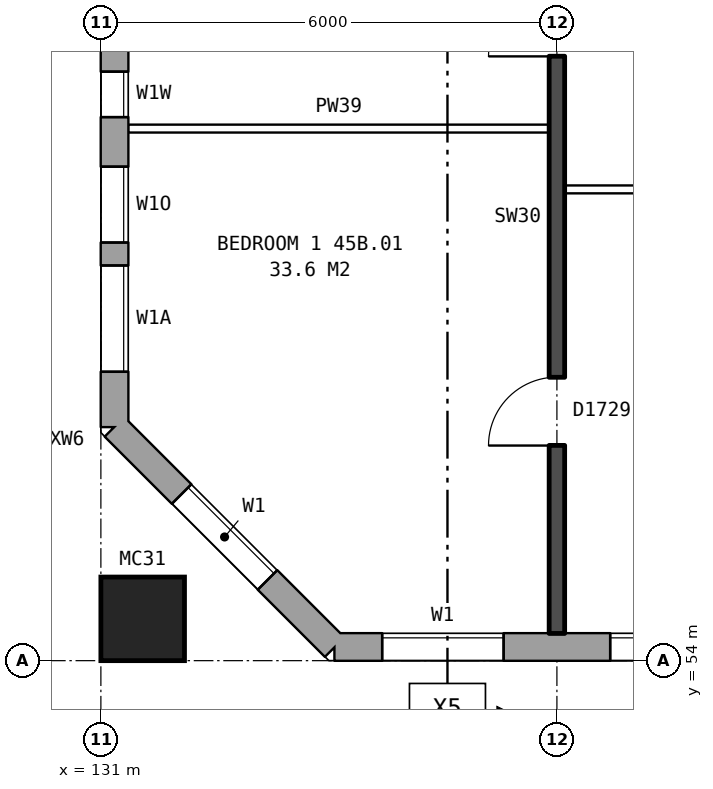
"""IFC4 building model, lengths in metres.
Left out: names, types, materials, properties, quantities, classifications, styles, units other than length and angle.
Written with IfcOpenShell. Run it as: python <this file> out.ifc"""

import sys

from ifc_helpers import new_model, si_unit, direction, frame, frame_2d, origin, origin_2d, place, context, subcontext, project, spatial, rectangle, hollow_rectangle, extrude, element, fill, save


model = new_model("IFC4")
c1 = context("Model", 3, precision=1e-05, world=origin(), true_north=direction((0.0, 1.0)))
c2 = subcontext(c1, "Body", "Model", "MODEL_VIEW")
j1 = project(units=[si_unit("LENGTHUNIT", "METRE"), si_unit("PLANEANGLEUNIT", "RADIAN")], contexts=[c1])
p1 = place(None, origin())
s1 = spatial("IfcSite", under=j1, at=p1, CompositionType="ELEMENT")
p2 = place(p1, origin())
s2 = spatial("IfcBuilding", under=s1, at=p2, CompositionType="ELEMENT")
p3 = place(p2, frame((0.0, 0.0, 160.9)))
s3 = spatial("IfcBuildingStorey", under=s2, at=p3, CompositionType="ELEMENT", Elevation=160.9)
p4 = place(p3, frame((131.55, 54.55, 0.0), z_axis=(0.0, 0.0, 1.0), x_axis=(1.0, 0.0, 0.0)))
e1 = element("IfcColumn", 1, at=p4, inside=s3, PredefinedType="COLUMN", context=c2, shape_type="SweptSolid", body=[
    extrude(hollow_rectangle(XDim=1.1, YDim=1.1, WallThickness=0.06, at=origin_2d()), origin(), (0.0, 0.0, 1.0), 3.1),
])
p5 = place(p3, frame((131.18, 57.075, 0.0), z_axis=(0.0, 0.0, 1.0), x_axis=(0.707106781187, -0.707106781187, 0.0)))
e2 = element("IfcWall", 2, at=p5, inside=s3, PredefinedType="STANDARD", context=c2, shape_type="SweptSolid", body=[
    extrude(rectangle(XDim=4.094, YDim=0.36, at=frame_2d((2.047, 0.0))), origin(), (0.0, 0.0, 1.0), 2.85),
])
p6 = place(p5, frame((1.247, 0.0, 0.8)))
e3 = element("IfcOpeningElement", 3, at=p6, cuts=e2, PredefinedType="OPENING", context=c2, shape_type="SweptSolid", body=[
    extrude(rectangle(XDim=1.6, YDim=1.8, at=frame_2d((0.8, 0.9))), frame((0.0, 0.19, 0.0), z_axis=(0.0, -1.0, 0.0), x_axis=(1.0, 0.0, 0.0)), (0.0, 0.0, 1.0), 0.38),
])
p7 = place(p3, frame((134.075, 54.18, 0.0), z_axis=(0.0, 0.0, 1.0), x_axis=(1.0, 0.0, 0.0)))
e4 = element("IfcWall", 4, at=p7, inside=s3, PredefinedType="STANDARD", context=c2, shape_type="SweptSolid", body=[
    extrude(rectangle(XDim=34.351, YDim=0.36, at=frame_2d((17.175, 0.0))), origin(), (0.0, 0.0, 1.0), 2.85),
])
p8 = place(p7, frame((0.625, 0.0, 0.8)))
e5 = element("IfcOpeningElement", 5, at=p8, cuts=e4, PredefinedType="OPENING", context=c2, shape_type="SweptSolid", body=[
    extrude(rectangle(XDim=1.6, YDim=1.8, at=frame_2d((0.8, 0.9))), frame((0.0, 0.19, 0.0), z_axis=(0.0, -1.0, 0.0), x_axis=(1.0, 0.0, 0.0)), (0.0, 0.0, 1.0), 0.38),
])
p9 = place(p7, frame((3.625, 0.0, 0.8)))
e6 = element("IfcOpeningElement", 6, at=p9, cuts=e4, PredefinedType="OPENING", context=c2, shape_type="SweptSolid", body=[
    extrude(rectangle(XDim=1.6, YDim=1.8, at=frame_2d((0.8, 0.9))), frame((0.0, 0.19, 0.0), z_axis=(0.0, -1.0, 0.0), x_axis=(1.0, 0.0, 0.0)), (0.0, 0.0, 1.0), 0.38),
])
p10 = place(p7, frame((6.625, 0.0, 0.8)))
e7 = element("IfcOpeningElement", 7, at=p10, cuts=e4, PredefinedType="OPENING", context=c2, shape_type="SweptSolid", body=[
    extrude(rectangle(XDim=1.6, YDim=1.8, at=frame_2d((0.8, 0.9))), frame((0.0, 0.19, 0.0), z_axis=(0.0, -1.0, 0.0), x_axis=(1.0, 0.0, 0.0)), (0.0, 0.0, 1.0), 0.38),
])
p11 = place(p7, frame((9.625, 0.0, 0.8)))
e8 = element("IfcOpeningElement", 8, at=p11, cuts=e4, PredefinedType="OPENING", context=c2, shape_type="SweptSolid", body=[
    extrude(rectangle(XDim=1.6, YDim=1.8, at=frame_2d((0.8, 0.9))), frame((0.0, 0.19, 0.0), z_axis=(0.0, -1.0, 0.0), x_axis=(1.0, 0.0, 0.0)), (0.0, 0.0, 1.0), 0.38),
])
p12 = place(p7, frame((12.625, 0.0, 0.15)))
e9 = element("IfcOpeningElement", 9, at=p12, cuts=e4, PredefinedType="OPENING", context=c2, shape_type="SweptSolid", body=[
    extrude(rectangle(XDim=0.8, YDim=0.9, at=frame_2d((0.4, 0.45))), frame((0.0, 0.19, 0.0), z_axis=(0.0, -1.0, 0.0), x_axis=(1.0, 0.0, 0.0)), (0.0, 0.0, 1.0), 0.38),
])
p13 = place(p7, frame((15.625, 0.0, 0.8)))
e10 = element("IfcOpeningElement", 10, at=p13, cuts=e4, PredefinedType="OPENING", context=c2, shape_type="SweptSolid", body=[
    extrude(rectangle(XDim=1.6, YDim=1.8, at=frame_2d((0.8, 0.9))), frame((0.0, 0.19, 0.0), z_axis=(0.0, -1.0, 0.0), x_axis=(1.0, 0.0, 0.0)), (0.0, 0.0, 1.0), 0.38),
])
p14 = place(p7, frame((18.625, 0.0, 0.8)))
e11 = element("IfcOpeningElement", 11, at=p14, cuts=e4, PredefinedType="OPENING", context=c2, shape_type="SweptSolid", body=[
    extrude(rectangle(XDim=1.6, YDim=1.8, at=frame_2d((0.8, 0.9))), frame((0.0, 0.19, 0.0), z_axis=(0.0, -1.0, 0.0), x_axis=(1.0, 0.0, 0.0)), (0.0, 0.0, 1.0), 0.38),
])
p15 = place(p7, frame((22.175, 0.0, 1.7)))
e12 = element("IfcOpeningElement", 12, at=p15, cuts=e4, PredefinedType="OPENING", context=c2, shape_type="SweptSolid", body=[
    extrude(rectangle(XDim=0.8, YDim=0.9, at=frame_2d((0.4, 0.45))), frame((0.0, 0.19, 0.0), z_axis=(0.0, -1.0, 0.0), x_axis=(1.0, 0.0, 0.0)), (0.0, 0.0, 1.0), 0.38),
])
p16 = place(p7, frame((24.625, 0.0, 0.8)))
e13 = element("IfcOpeningElement", 13, at=p16, cuts=e4, PredefinedType="OPENING", context=c2, shape_type="SweptSolid", body=[
    extrude(rectangle(XDim=1.6, YDim=1.8, at=frame_2d((0.8, 0.9))), frame((0.0, 0.19, 0.0), z_axis=(0.0, -1.0, 0.0), x_axis=(1.0, 0.0, 0.0)), (0.0, 0.0, 1.0), 0.38),
])
p17 = place(p7, frame((27.625, 0.0, 0.8)))
e14 = element("IfcOpeningElement", 14, at=p17, cuts=e4, PredefinedType="OPENING", context=c2, shape_type="SweptSolid", body=[
    extrude(rectangle(XDim=1.6, YDim=1.8, at=frame_2d((0.8, 0.9))), frame((0.0, 0.19, 0.0), z_axis=(0.0, -1.0, 0.0), x_axis=(1.0, 0.0, 0.0)), (0.0, 0.0, 1.0), 0.38),
])
p18 = place(p7, frame((30.625, 0.0, 0.8)))
e15 = element("IfcOpeningElement", 15, at=p18, cuts=e4, PredefinedType="OPENING", context=c2, shape_type="SweptSolid", body=[
    extrude(rectangle(XDim=1.6, YDim=1.8, at=frame_2d((0.8, 0.9))), frame((0.0, 0.19, 0.0), z_axis=(0.0, -1.0, 0.0), x_axis=(1.0, 0.0, 0.0)), (0.0, 0.0, 1.0), 0.38),
])
p19 = place(p7, frame((13.725, 0.0, 0.25)))
e16 = element("IfcOpeningElement", 16, at=p19, cuts=e4, PredefinedType="OPENING", context=c2, shape_type="SweptSolid", body=[
    extrude(rectangle(XDim=1.0, YDim=1.8, at=frame_2d((0.5, 0.9))), frame((0.0, 0.19, 0.0), z_axis=(0.0, -1.0, 0.0), x_axis=(1.0, 0.0, 0.0)), (0.0, 0.0, 1.0), 0.38),
])
p20 = place(p7, frame((23.275, 0.0, 0.8)))
e17 = element("IfcOpeningElement", 17, at=p20, cuts=e4, PredefinedType="OPENING", context=c2, shape_type="SweptSolid", body=[
    extrude(rectangle(XDim=1.0, YDim=1.8, at=frame_2d((0.5, 0.9))), frame((0.0, 0.19, 0.0), z_axis=(0.0, -1.0, 0.0), x_axis=(1.0, 0.0, 0.0)), (0.0, 0.0, 1.0), 0.38),
])
p21 = place(p3, frame((131.18, 82.925, 0.0), z_axis=(0.0, 0.0, 1.0), x_axis=(0.0, -1.0, 0.0)))
e18 = element("IfcWall", 18, at=p21, inside=s3, PredefinedType="STANDARD", context=c2, shape_type="SweptSolid", body=[
    extrude(rectangle(XDim=25.851, YDim=0.36, at=frame_2d((12.925, 0.0))), origin(), (0.0, 0.0, 1.0), 2.85),
])
p22 = place(p21, frame((1.075, 0.0, 0.8)))
e19 = element("IfcOpeningElement", 19, at=p22, cuts=e18, PredefinedType="OPENING", context=c2, shape_type="SweptSolid", body=[
    extrude(rectangle(XDim=1.2, YDim=1.8, at=frame_2d((0.6, 0.9))), frame((0.0, 0.19, 0.0), z_axis=(0.0, -1.0, 0.0), x_axis=(1.0, 0.0, 0.0)), (0.0, 0.0, 1.0), 0.38),
])
p23 = place(p21, frame((2.575, 0.0, 0.8)))
e20 = element("IfcOpeningElement", 20, at=p23, cuts=e18, PredefinedType="OPENING", context=c2, shape_type="SweptSolid", body=[
    extrude(rectangle(XDim=1.2, YDim=0.9, at=frame_2d((0.6, 0.45))), frame((0.0, 0.19, 0.0), z_axis=(0.0, -1.0, 0.0), x_axis=(1.0, 0.0, 0.0)), (0.0, 0.0, 1.0), 0.38),
])
p24 = place(p21, frame((19.475, 0.0, 1.65)))
e21 = element("IfcOpeningElement", 21, at=p24, cuts=e18, PredefinedType="OPENING", context=c2, shape_type="SweptSolid", body=[
    extrude(rectangle(XDim=1.2, YDim=0.9, at=frame_2d((0.6, 0.45))), frame((0.0, 0.19, 0.0), z_axis=(0.0, -1.0, 0.0), x_axis=(1.0, 0.0, 0.0)), (0.0, 0.0, 1.0), 0.38),
])
p25 = place(p21, frame((22.425, 0.0, 0.8)))
e22 = element("IfcOpeningElement", 22, at=p25, cuts=e18, PredefinedType="OPENING", context=c2, shape_type="SweptSolid", body=[
    extrude(rectangle(XDim=1.0, YDim=1.2, at=frame_2d((0.5, 0.6))), frame((0.0, 0.19, 0.0), z_axis=(0.0, -1.0, 0.0), x_axis=(1.0, 0.0, 0.0)), (0.0, 0.0, 1.0), 0.38),
])
p26 = place(p21, frame((4.975, 0.0, 1.7)))
e23 = element("IfcOpeningElement", 23, at=p26, cuts=e18, PredefinedType="OPENING", context=c2, shape_type="SweptSolid", body=[
    extrude(rectangle(XDim=1.4, YDim=0.9, at=frame_2d((0.7, 0.45))), frame((0.0, 0.19, 0.0), z_axis=(0.0, -1.0, 0.0), x_axis=(1.0, 0.0, 0.0)), (0.0, 0.0, 1.0), 0.38),
])
p27 = place(p21, frame((21.175, 0.0, 0.35)))
e24 = element("IfcOpeningElement", 24, at=p27, cuts=e18, PredefinedType="OPENING", context=c2, shape_type="SweptSolid", body=[
    extrude(rectangle(XDim=0.6, YDim=0.9, at=frame_2d((0.3, 0.45))), frame((0.0, 0.19, 0.0), z_axis=(0.0, -1.0, 0.0), x_axis=(1.0, 0.0, 0.0)), (0.0, 0.0, 1.0), 0.38),
])
p28 = place(p21, frame((23.725, 0.0, 0.8)))
e25 = element("IfcOpeningElement", 25, at=p28, cuts=e18, PredefinedType="OPENING", context=c2, shape_type="SweptSolid", body=[
    extrude(rectangle(XDim=1.4, YDim=1.8, at=frame_2d((0.7, 0.9))), frame((0.0, 0.19, 0.0), z_axis=(0.0, -1.0, 0.0), x_axis=(1.0, 0.0, 0.0)), (0.0, 0.0, 1.0), 0.38),
])
p29 = place(p3, frame((137.1, 60.2, 0.0), z_axis=(0.0, 0.0, 1.0), x_axis=(1.0, 0.0, 0.0)))
e26 = element("IfcWall", 26, at=p29, inside=s3, PredefinedType="PARTITIONING", context=c2, shape_type="SweptSolid", body=[
    extrude(rectangle(XDim=5.8, YDim=0.1, at=frame_2d((2.9, 0.0))), origin(), (0.0, 0.0, 1.0), 2.85),
])
p30 = place(p29, frame((1.3, 0.0, 0.0)))
e27 = element("IfcOpeningElement", 27, at=p30, cuts=e26, PredefinedType="OPENING", context=c2, shape_type="SweptSolid", body=[
    extrude(rectangle(XDim=0.9, YDim=2.1, at=frame_2d((0.45, 1.05))), frame((0.0, 0.06, 0.0), z_axis=(0.0, -1.0, 0.0), x_axis=(1.0, 0.0, 0.0)), (0.0, 0.0, 1.0), 0.12),
])
p31 = place(p29, frame((4.2, 0.0, 0.0)))
e28 = element("IfcOpeningElement", 28, at=p31, cuts=e26, PredefinedType="OPENING", context=c2, shape_type="SweptSolid", body=[
    extrude(rectangle(XDim=0.9, YDim=2.1, at=frame_2d((0.45, 1.05))), frame((0.0, 0.06, 0.0), z_axis=(0.0, -1.0, 0.0), x_axis=(1.0, 0.0, 0.0)), (0.0, 0.0, 1.0), 0.12),
])
p32 = place(p3, frame((131.36, 61.0, 0.0), z_axis=(0.0, 0.0, 1.0), x_axis=(1.0, 0.0, 0.0)))
e29 = element("IfcWall", 29, at=p32, inside=s3, PredefinedType="PARTITIONING", context=c2, shape_type="SweptSolid", body=[
    extrude(rectangle(XDim=5.54, YDim=0.1, at=frame_2d((2.77, 0.0))), origin(), (0.0, 0.0, 1.0), 2.85),
])
p33 = place(p3, frame((137.0, 54.36, 0.0), z_axis=(0.0, 0.0, 1.0), x_axis=(0.0, 1.0, 0.0)))
e30 = element("IfcWall", 30, at=p33, inside=s3, PredefinedType="SOLIDWALL", context=c2, shape_type="SweptSolid", body=[
    extrude(rectangle(XDim=9.44, YDim=0.2, at=frame_2d((4.72, 0.0))), origin(), (0.0, 0.0, 1.0), 2.85),
])
p34 = place(p33, frame((2.47, 0.0, 0.0)))
e31 = element("IfcOpeningElement", 31, at=p34, cuts=e30, PredefinedType="OPENING", context=c2, shape_type="SweptSolid", body=[
    extrude(rectangle(XDim=0.9, YDim=2.1, at=frame_2d((0.45, 1.05))), frame((0.0, 0.11, 0.0), z_axis=(0.0, -1.0, 0.0), x_axis=(1.0, 0.0, 0.0)), (0.0, 0.0, 1.0), 0.22),
])
p35 = place(p33, frame((7.59, 0.0, 0.0)))
e32 = element("IfcOpeningElement", 32, at=p35, cuts=e30, PredefinedType="OPENING", context=c2, shape_type="SweptSolid", body=[
    extrude(rectangle(XDim=0.9, YDim=2.1, at=frame_2d((0.45, 1.05))), frame((0.0, 0.11, 0.0), z_axis=(0.0, -1.0, 0.0), x_axis=(1.0, 0.0, 0.0)), (0.0, 0.0, 1.0), 0.22),
])
p36 = place(p6, origin())
e33 = element("IfcWindow", 33, at=p36, inside=s3, PartitioningType="SINGLE_PANEL", PredefinedType="WINDOW", context=c2, shape_type="SweptSolid", body=[
    extrude(rectangle(XDim=1.6, YDim=1.8, at=frame_2d((0.8, 0.9))), frame((0.0, 0.15, 0.0), z_axis=(0.0, -1.0, 0.0), x_axis=(1.0, 0.0, 0.0)), (0.0, 0.0, 1.0), 0.06),
])
fill(e3, e33)
p37 = place(p8, origin())
e34 = element("IfcWindow", 34, at=p37, inside=s3, PartitioningType="SINGLE_PANEL", PredefinedType="WINDOW", context=c2, shape_type="SweptSolid", body=[
    extrude(rectangle(XDim=1.6, YDim=1.8, at=frame_2d((0.8, 0.9))), frame((0.0, 0.15, 0.0), z_axis=(0.0, -1.0, 0.0), x_axis=(1.0, 0.0, 0.0)), (0.0, 0.0, 1.0), 0.06),
])
fill(e5, e34)
p38 = place(p9, origin())
e35 = element("IfcWindow", 35, at=p38, inside=s3, PartitioningType="SINGLE_PANEL", PredefinedType="WINDOW", context=c2, shape_type="SweptSolid", body=[
    extrude(rectangle(XDim=1.6, YDim=1.8, at=frame_2d((0.8, 0.9))), frame((0.0, 0.15, 0.0), z_axis=(0.0, -1.0, 0.0), x_axis=(1.0, 0.0, 0.0)), (0.0, 0.0, 1.0), 0.06),
])
fill(e6, e35)
p39 = place(p25, origin())
e36 = element("IfcWindow", 36, at=p39, inside=s3, PartitioningType="SINGLE_PANEL", PredefinedType="WINDOW", context=c2, shape_type="SweptSolid", body=[
    extrude(rectangle(XDim=1.0, YDim=1.2, at=frame_2d((0.5, 0.6))), frame((0.0, 0.15, 0.0), z_axis=(0.0, -1.0, 0.0), x_axis=(1.0, 0.0, 0.0)), (0.0, 0.0, 1.0), 0.06),
])
fill(e22, e36)
p40 = place(p34, origin())
e37 = element("IfcDoor", 37, at=p40, inside=s3, OperationType="SINGLE_SWING_LEFT", PredefinedType="DOOR", context=c2, shape_type="SweptSolid", body=[
    extrude(rectangle(XDim=0.9, YDim=2.1, at=frame_2d((0.45, 1.05))), frame((0.0, 0.025, 0.0), z_axis=(0.0, -1.0, 0.0), x_axis=(1.0, 0.0, 0.0)), (0.0, 0.0, 1.0), 0.05),
])
fill(e31, e37)
p41 = place(p35, origin())
e38 = element("IfcDoor", 38, at=p41, inside=s3, OperationType="SINGLE_SWING_LEFT", PredefinedType="DOOR", context=c2, shape_type="SweptSolid", body=[
    extrude(rectangle(XDim=0.9, YDim=2.1, at=frame_2d((0.45, 1.05))), frame((0.0, 0.025, 0.0), z_axis=(0.0, -1.0, 0.0), x_axis=(1.0, 0.0, 0.0)), (0.0, 0.0, 1.0), 0.05),
])
fill(e32, e38)
p42 = place(p27, origin())
e39 = element("IfcWindow", 39, at=p42, inside=s3, PartitioningType="SINGLE_PANEL", PredefinedType="WINDOW", context=c2, shape_type="SweptSolid", body=[
    extrude(rectangle(XDim=0.6, YDim=0.9, at=frame_2d((0.3, 0.45))), frame((0.0, 0.15, 0.0), z_axis=(0.0, -1.0, 0.0), x_axis=(1.0, 0.0, 0.0)), (0.0, 0.0, 1.0), 0.06),
])
fill(e24, e39)
p43 = place(p28, origin())
e40 = element("IfcWindow", 40, at=p43, inside=s3, PartitioningType="SINGLE_PANEL", PredefinedType="WINDOW", context=c2, shape_type="SweptSolid", body=[
    extrude(rectangle(XDim=1.4, YDim=1.8, at=frame_2d((0.7, 0.9))), frame((0.0, 0.15, 0.0), z_axis=(0.0, -1.0, 0.0), x_axis=(1.0, 0.0, 0.0)), (0.0, 0.0, 1.0), 0.06),
])
fill(e25, e40)
save(model, sys.argv[1])
